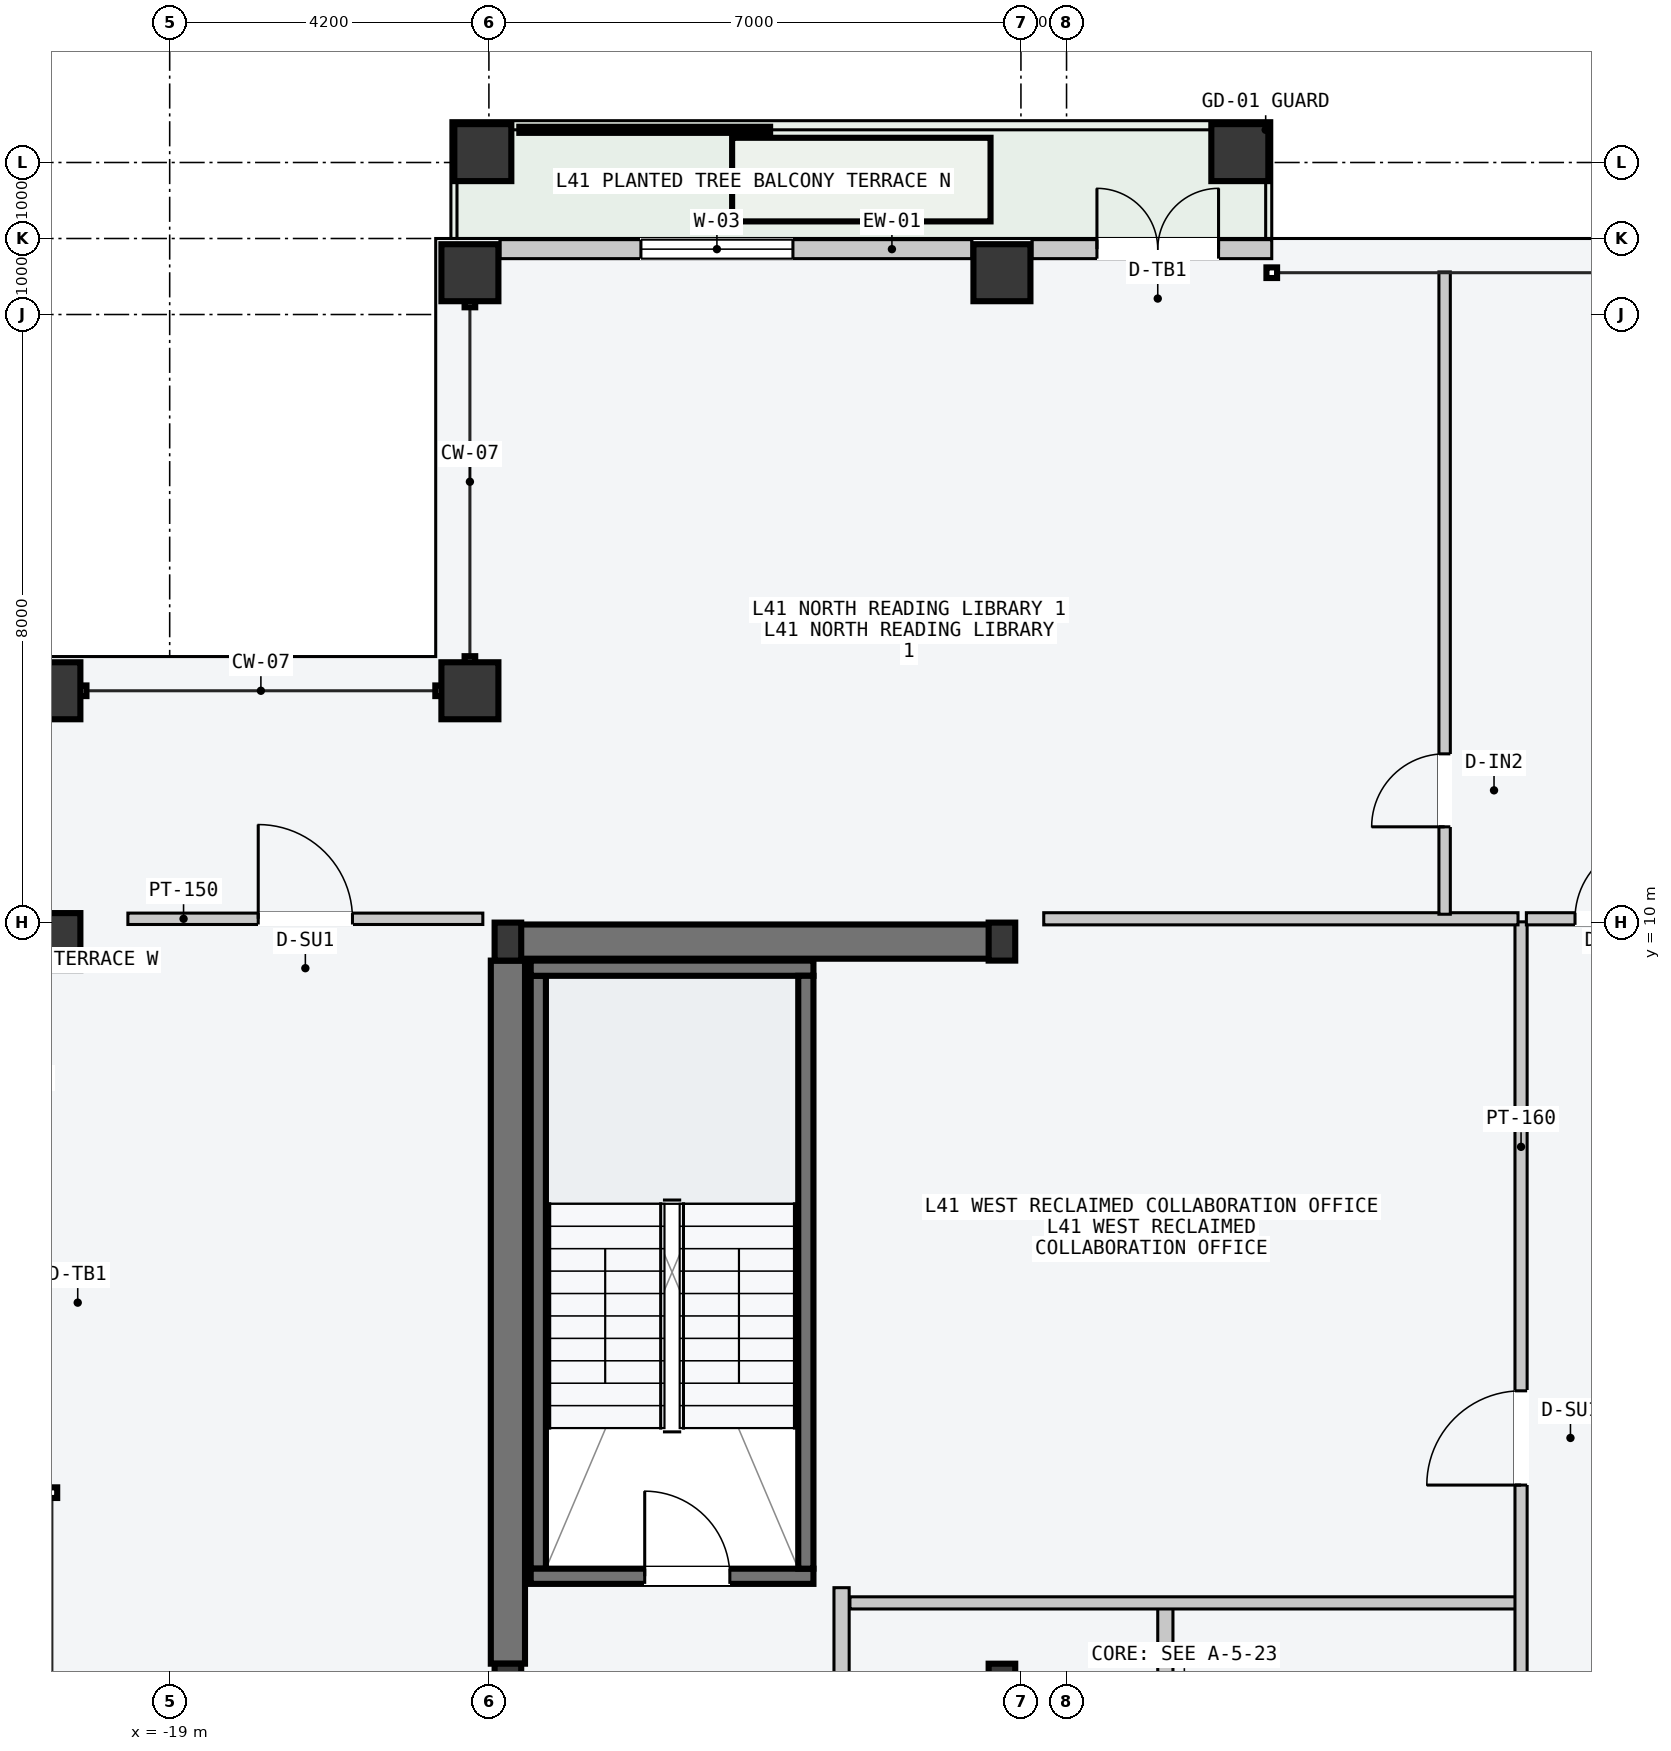
"""IFC4 building model, lengths in metres.
Left out: names, types, materials, properties, quantities, classifications, styles, units other than length and angle.
Written with IfcOpenShell. Run it as: python <this file> out.ifc"""

import sys

from ifc_helpers import new_model, si_unit, direction, frame, frame_2d, origin, origin_2d, place, context, subcontext, project, spatial, rectangle, hollow_rectangle, i_section, extrude, element, fill, save


model = new_model("IFC4")
c1 = context("Model", 3, precision=1e-05, world=origin(), true_north=direction((0.0, 1.0)))
c2 = subcontext(c1, "Body", "Model", "MODEL_VIEW")
j1 = project(units=[si_unit("LENGTHUNIT", "METRE"), si_unit("PLANEANGLEUNIT", "RADIAN")], contexts=[c1])
p1 = place(None, origin())
s1 = spatial("IfcSite", under=j1, at=p1, CompositionType="ELEMENT")
p2 = place(p1, origin())
s2 = spatial("IfcBuilding", under=s1, at=p2, CompositionType="ELEMENT")
p3 = place(p2, frame((0.0, 0.0, 158.7)))
s3 = spatial("IfcBuildingStorey", under=s2, at=p3, CompositionType="ELEMENT", Elevation=158.7)
p4 = place(p3, frame((-14.53, 9.75, -0.2), z_axis=(0.0, 0.0, 1.0), x_axis=(1.0, 0.0, 0.0)))
e1 = element("IfcWall", 1, at=p4, inside=s3, PredefinedType="SHEAR", context=c2, shape_type="SweptSolid", body=[
    extrude(rectangle(XDim=6.46, YDim=0.45, at=frame_2d((3.23, 0.0))), origin(), (0.0, 0.0, 1.0), 3.6),
])
p5 = place(p3, frame((-14.55, 0.25, -0.2), z_axis=(0.0, 0.0, 1.0), x_axis=(0.0, 1.0, 0.0)))
e2 = element("IfcWall", 2, at=p5, inside=s3, PredefinedType="SHEAR", context=c2, shape_type="SweptSolid", body=[
    extrude(rectangle(XDim=9.25, YDim=0.45, at=frame_2d((4.625, 0.0))), origin(), (0.0, 0.0, 1.0), 3.6),
])
p6 = place(p3, frame((-14.15, 1.5, -0.2), z_axis=(0.0, 0.0, 1.0), x_axis=(0.0, 1.0, 0.0)))
e3 = element("IfcWall", 3, at=p6, inside=s3, PredefinedType="SOLIDWALL", context=c2, shape_type="SweptSolid", body=[
    extrude(rectangle(XDim=7.8, YDim=0.2, at=frame_2d((3.9, 0.0))), origin(), (0.0, 0.0, 1.0), 3.6),
])
p7 = place(p3, frame((-14.25, 1.4, -0.2), z_axis=(0.0, 0.0, 1.0), x_axis=(1.0, 0.0, 0.0)))
e4 = element("IfcWall", 4, at=p7, inside=s3, PredefinedType="SOLIDWALL", context=c2, shape_type="SweptSolid", body=[
    extrude(rectangle(XDim=3.72, YDim=0.2, at=frame_2d((1.86, 0.0))), origin(), (0.0, 0.0, 1.0), 3.6),
])
p8 = place(p7, frame((1.5, 0.0, 0.2)))
e5 = element("IfcOpeningElement", 5, at=p8, cuts=e4, PredefinedType="OPENING", context=c2, shape_type="SweptSolid", body=[
    extrude(rectangle(XDim=1.12, YDim=2.18, at=frame_2d((0.56, 1.09))), frame((0.0, 0.11, 0.0), z_axis=(0.0, -1.0, 0.0), x_axis=(1.0, 0.0, 0.0)), (0.0, 0.0, 1.0), 0.22),
])
p9 = place(p3, frame((-14.25, 9.4, -0.2), z_axis=(0.0, 0.0, 1.0), x_axis=(1.0, 0.0, 0.0)))
e6 = element("IfcWall", 6, at=p9, inside=s3, PredefinedType="SOLIDWALL", context=c2, shape_type="SweptSolid", body=[
    extrude(rectangle(XDim=3.72, YDim=0.2, at=frame_2d((1.86, 0.0))), origin(), (0.0, 0.0, 1.0), 3.6),
])
p10 = place(p3, frame((-10.63, 1.5, -0.2), z_axis=(0.0, 0.0, 1.0), x_axis=(0.0, 1.0, 0.0)))
e7 = element("IfcWall", 7, at=p10, inside=s3, PredefinedType="SOLIDWALL", context=c2, shape_type="SweptSolid", body=[
    extrude(rectangle(XDim=7.8, YDim=0.2, at=frame_2d((3.9, 0.0))), origin(), (0.0, 0.0, 1.0), 3.6),
])
for number, where, z_axis, x_axis in (
    (8, (-14.55, 0.0, 0.0), (0.0, 0.0, 1.0), (1.0, 0.0, 0.0)),
    (9, (-14.55, 9.75, 0.0), (0.0, 0.0, 1.0), (1.0, 0.0, 0.0)),
    (10, (-8.05, 0.0, 0.0), (0.0, 0.0, 1.0), (1.0, 0.0, 0.0)),
    (11, (-8.05, 9.75, 0.0), (0.0, 0.0, 1.0), (1.0, 0.0, 0.0)),
):
    element("IfcColumn", number, at=place(p3, frame(where, z_axis=z_axis, x_axis=x_axis)), inside=s3, PredefinedType="COLUMN", context=c2, shape_type="SweptSolid", body=[
        extrude(i_section(OverallWidth=0.35, OverallDepth=0.5, WebThickness=0.02, FlangeThickness=0.032, at=origin_2d()), origin(), (0.0, 0.0, 1.0), 3.6),
    ])
for number, where, z_axis, x_axis in (
    (12, (-15.05, 18.55, 0.0), (0.0, 0.0, 1.0), (1.0, 0.0, 0.0)),
    (13, (-8.05, 18.55, 0.0), (0.0, 0.0, 1.0), (1.0, 0.0, 0.0)),
    (14, (-20.55, 9.75, 0.0), (0.0, 0.0, 1.0), (0.0, 1.0, 0.0)),
    (15, (-20.55, 13.05, 0.0), (0.0, 0.0, 1.0), (0.0, 1.0, 0.0)),
    (16, (-15.05, 13.05, 0.0), (0.0, 0.0, 1.0), (1.0, 0.0, 0.0)),
):
    element("IfcColumn", number, at=place(p3, frame(where, z_axis=z_axis, x_axis=x_axis)), inside=s3, PredefinedType="COLUMN", context=c2, shape_type="SweptSolid", body=[
        extrude(hollow_rectangle(XDim=0.75, YDim=0.75, WallThickness=0.032, at=origin_2d()), origin(), (0.0, 0.0, 1.0), 3.6),
    ])
for number, where, z_axis, x_axis in (
    (17, (-14.88, 20.13, -0.2), (0.0, 0.0, 1.0), (1.0, 0.0, 0.0)),
    (18, (-4.92, 20.13, -0.2), (0.0, 0.0, 1.0), (1.0, 0.0, 0.0)),
):
    element("IfcColumn", number, at=place(p3, frame(where, z_axis=z_axis, x_axis=x_axis)), inside=s3, PredefinedType="COLUMN", context=c2, shape_type="SweptSolid", body=[
        extrude(hollow_rectangle(XDim=0.75, YDim=0.75, WallThickness=0.032, at=origin_2d()), origin(), (0.0, 0.0, 1.0), 3.8),
    ])
p11 = place(p3, frame((-14.655, 18.86, 0.0), z_axis=(0.0, 0.0, 1.0), x_axis=(1.0, 0.0, 0.0)))
e19 = element("IfcWall", 19, at=p11, inside=s3, PredefinedType="STANDARD", context=c2, shape_type="SweptSolid", body=[
    extrude(rectangle(XDim=6.21, YDim=0.25, at=frame_2d((3.105, 0.0))), origin(), (0.0, 0.0, 1.0), 3.4),
])
p12 = place(p11, frame((1.855, 0.0, 0.85)))
e20 = element("IfcOpeningElement", 20, at=p12, cuts=e19, PredefinedType="OPENING", context=c2, shape_type="SweptSolid", body=[
    extrude(rectangle(XDim=2.0, YDim=2.1, at=frame_2d((1.0, 1.05))), frame((0.0, 0.135, 0.0), z_axis=(0.0, -1.0, 0.0), x_axis=(1.0, 0.0, 0.0)), (0.0, 0.0, 1.0), 0.27),
])
p13 = place(p3, frame((-7.655, 18.86, 0.0), z_axis=(0.0, 0.0, 1.0), x_axis=(1.0, 0.0, 0.0)))
e21 = element("IfcWall", 21, at=p13, inside=s3, PredefinedType="STANDARD", context=c2, shape_type="SweptSolid", body=[
    extrude(rectangle(XDim=3.155, YDim=0.25, at=frame_2d((1.578, 0.0))), origin(), (0.0, 0.0, 1.0), 3.4),
])
p14 = place(p13, frame((0.855, 0.0, 0.0)))
e22 = element("IfcOpeningElement", 22, at=p14, cuts=e21, PredefinedType="OPENING", context=c2, shape_type="SweptSolid", body=[
    extrude(rectangle(XDim=1.6, YDim=2.2, at=frame_2d((0.8, 1.1))), frame((0.0, 0.135, 0.0), z_axis=(0.0, -1.0, 0.0), x_axis=(1.0, 0.0, 0.0)), (0.0, 0.0, 1.0), 0.27),
])
p15 = place(p3, frame((-5.9, -9.45, 0.0), z_axis=(0.0, 0.0, 1.0), x_axis=(0.0, 1.0, 0.0)))
e23 = element("IfcWall", 23, at=p15, inside=s3, PredefinedType="PARTITIONING", context=c2, shape_type="SweptSolid", body=[
    extrude(rectangle(XDim=10.5, YDim=0.2, at=frame_2d((5.25, 0.0))), origin(), (0.0, 0.0, 1.0), 3.4),
])
p16 = place(p15, frame((3.9, 0.0, 0.0)))
e24 = element("IfcOpeningElement", 24, at=p16, cuts=e23, PredefinedType="OPENING", context=c2, shape_type="SweptSolid", body=[
    extrude(rectangle(XDim=1.5, YDim=2.2, at=frame_2d((0.75, 1.1))), frame((0.0, 0.11, 0.0), z_axis=(0.0, -1.0, 0.0), x_axis=(1.0, 0.0, 0.0)), (0.0, 0.0, 1.0), 0.22),
])
p17 = place(p3, frame((-10.16, -2.55, 0.0), z_axis=(0.0, 0.0, 1.0), x_axis=(0.0, 1.0, 0.0)))
e25 = element("IfcWall", 25, at=p17, inside=s3, PredefinedType="PARTITIONING", context=c2, shape_type="SweptSolid", body=[
    extrude(rectangle(XDim=3.8, YDim=0.2, at=frame_2d((1.9, 0.0))), origin(), (0.0, 0.0, 1.0), 3.4),
])
p18 = place(p17, frame((1.3, 0.0, 0.0)))
e26 = element("IfcOpeningElement", 26, at=p18, cuts=e25, PredefinedType="OPENING", context=c2, shape_type="SweptSolid", body=[
    extrude(rectangle(XDim=1.1, YDim=2.15, at=frame_2d((0.55, 1.075))), frame((0.0, 0.11, 0.0), z_axis=(0.0, -1.0, 0.0), x_axis=(1.0, 0.0, 0.0)), (0.0, 0.0, 1.0), 0.22),
])
p19 = place(p3, frame((-10.05, 1.05, 0.0), z_axis=(0.0, 0.0, 1.0), x_axis=(1.0, 0.0, 0.0)))
e27 = element("IfcWall", 27, at=p19, inside=s3, PredefinedType="PARTITIONING", context=c2, shape_type="SweptSolid", body=[
    extrude(rectangle(XDim=8.79, YDim=0.16, at=frame_2d((4.395, 0.0))), origin(), (0.0, 0.0, 1.0), 3.4),
])
p20 = place(p3, frame((-1.22, -3.5, 0.0), z_axis=(0.0, 0.0, 1.0), x_axis=(0.0, 1.0, 0.0)))
e28 = element("IfcWall", 28, at=p20, inside=s3, PredefinedType="PARTITIONING", context=c2, shape_type="SweptSolid", body=[
    extrude(rectangle(XDim=13.51, YDim=0.16, at=frame_2d((6.755, 0.0))), origin(), (0.0, 0.0, 1.0), 3.4),
])
p21 = place(p20, frame((6.1, 0.0, 0.0)))
e29 = element("IfcOpeningElement", 29, at=p21, cuts=e28, PredefinedType="OPENING", context=c2, shape_type="SweptSolid", body=[
    extrude(rectangle(XDim=1.24, YDim=2.24, at=frame_2d((0.62, 1.12))), frame((0.0, 0.09, 0.0), z_axis=(0.0, -1.0, 0.0), x_axis=(1.0, 0.0, 0.0)), (0.0, 0.0, 1.0), 0.18),
])
p22 = place(p20, frame((1.6, 0.0, 0.0)))
e30 = element("IfcOpeningElement", 30, at=p22, cuts=e28, PredefinedType="OPENING", context=c2, shape_type="SweptSolid", body=[
    extrude(rectangle(XDim=0.96, YDim=2.18, at=frame_2d((0.48, 1.09))), frame((0.0, 0.09, 0.0), z_axis=(0.0, -1.0, 0.0), x_axis=(1.0, 0.0, 0.0)), (0.0, 0.0, 1.0), 0.18),
])
p23 = place(p3, frame((-7.5, 10.05, 0.0), z_axis=(0.0, 0.0, 1.0), x_axis=(1.0, 0.0, 0.0)))
e31 = element("IfcWall", 31, at=p23, inside=s3, PredefinedType="PARTITIONING", context=c2, shape_type="SweptSolid", body=[
    extrude(rectangle(XDim=6.24, YDim=0.16, at=frame_2d((3.12, 0.0))), origin(), (0.0, 0.0, 1.0), 3.4),
])
p24 = place(p3, frame((-2.226, 10.11, 0.0), z_axis=(0.0, 0.0, 1.0), x_axis=(0.0, 1.0, 0.0)))
e32 = element("IfcWall", 32, at=p24, inside=s3, PredefinedType="PARTITIONING", context=c2, shape_type="SweptSolid", body=[
    extrude(rectangle(XDim=8.45, YDim=0.15, at=frame_2d((4.225, 0.0))), origin(), (0.0, 0.0, 1.0), 3.4),
])
p25 = place(p24, frame((1.15, 0.0, 0.0)))
e33 = element("IfcOpeningElement", 33, at=p25, cuts=e32, PredefinedType="OPENING", context=c2, shape_type="SweptSolid", body=[
    extrude(rectangle(XDim=0.96, YDim=2.18, at=frame_2d((0.48, 1.09))), frame((0.0, 0.085, 0.0), z_axis=(0.0, -1.0, 0.0), x_axis=(1.0, 0.0, 0.0)), (0.0, 0.0, 1.0), 0.17),
])
p26 = place(p3, frame((-1.15, 10.05, 0.0), z_axis=(0.0, 0.0, 1.0), x_axis=(1.0, 0.0, 0.0)))
e34 = element("IfcWall", 34, at=p26, inside=s3, PredefinedType="PARTITIONING", context=c2, shape_type="SweptSolid", body=[
    extrude(rectangle(XDim=2.3, YDim=0.16, at=frame_2d((1.15, 0.0))), origin(), (0.0, 0.0, 1.0), 3.4),
])
p27 = place(p26, frame((0.64, 0.0, 0.0)))
e35 = element("IfcOpeningElement", 35, at=p27, cuts=e34, PredefinedType="OPENING", context=c2, shape_type="SweptSolid", body=[
    extrude(rectangle(XDim=1.02, YDim=2.2, at=frame_2d((0.51, 1.1))), frame((0.0, 0.09, 0.0), z_axis=(0.0, -1.0, 0.0), x_axis=(1.0, 0.0, 0.0)), (0.0, 0.0, 1.0), 0.18),
])
p28 = place(p3, frame((-19.55, 10.05, 0.0), z_axis=(0.0, 0.0, 1.0), x_axis=(1.0, 0.0, 0.0)))
e36 = element("IfcWall", 36, at=p28, inside=s3, PredefinedType="PARTITIONING", context=c2, shape_type="SweptSolid", body=[
    extrude(rectangle(XDim=4.67, YDim=0.15, at=frame_2d((2.335, 0.0))), origin(), (0.0, 0.0, 1.0), 3.4),
])
p29 = place(p28, frame((1.715, 0.0, 0.0)))
e37 = element("IfcOpeningElement", 37, at=p29, cuts=e36, PredefinedType="OPENING", context=c2, shape_type="SweptSolid", body=[
    extrude(rectangle(XDim=1.24, YDim=2.24, at=frame_2d((0.62, 1.12))), frame((0.0, 0.085, 0.0), z_axis=(0.0, -1.0, 0.0), x_axis=(1.0, 0.0, 0.0)), (0.0, 0.0, 1.0), 0.17),
])
p30 = place(p8, origin())
e38 = element("IfcDoor", 38, at=p30, inside=s3, OperationType="SINGLE_SWING_LEFT", PredefinedType="DOOR", context=c2, shape_type="SweptSolid", body=[
    extrude(rectangle(XDim=1.12, YDim=2.18, at=frame_2d((0.56, 1.09))), frame((0.0, 0.025, 0.0), z_axis=(0.0, -1.0, 0.0), x_axis=(1.0, 0.0, 0.0)), (0.0, 0.0, 1.0), 0.05),
])
fill(e5, e38)
p31 = place(p12, origin())
e39 = element("IfcWindow", 39, at=p31, inside=s3, PartitioningType="SINGLE_PANEL", PredefinedType="WINDOW", context=c2, shape_type="SweptSolid", body=[
    extrude(rectangle(XDim=2.0, YDim=2.1, at=frame_2d((1.0, 1.05))), frame((0.0, 0.03, 0.0), z_axis=(0.0, -1.0, 0.0), x_axis=(1.0, 0.0, 0.0)), (0.0, 0.0, 1.0), 0.06),
])
fill(e20, e39)
p32 = place(p14, origin())
e40 = element("IfcDoor", 40, at=p32, inside=s3, OperationType="DOUBLE_DOOR_SINGLE_SWING", PredefinedType="DOOR", context=c2, shape_type="SweptSolid", body=[
    extrude(rectangle(XDim=1.6, YDim=2.2, at=frame_2d((0.8, 1.1))), frame((0.0, 0.025, 0.0), z_axis=(0.0, -1.0, 0.0), x_axis=(1.0, 0.0, 0.0)), (0.0, 0.0, 1.0), 0.05),
])
fill(e22, e40)
p33 = place(p21, origin())
e41 = element("IfcDoor", 41, at=p33, inside=s3, OperationType="SINGLE_SWING_LEFT", PredefinedType="DOOR", context=c2, shape_type="SweptSolid", body=[
    extrude(rectangle(XDim=1.24, YDim=2.24, at=frame_2d((0.62, 1.12))), frame((0.0, 0.025, 0.0), z_axis=(0.0, -1.0, 0.0), x_axis=(1.0, 0.0, 0.0)), (0.0, 0.0, 1.0), 0.05),
])
fill(e29, e41)
p34 = place(p25, origin())
e42 = element("IfcDoor", 42, at=p34, inside=s3, OperationType="SINGLE_SWING_LEFT", PredefinedType="DOOR", context=c2, shape_type="SweptSolid", body=[
    extrude(rectangle(XDim=0.96, YDim=2.18, at=frame_2d((0.48, 1.09))), frame((0.0, 0.025, 0.0), z_axis=(0.0, -1.0, 0.0), x_axis=(1.0, 0.0, 0.0)), (0.0, 0.0, 1.0), 0.05),
])
fill(e33, e42)
p35 = place(p27, origin())
e43 = element("IfcDoor", 43, at=p35, inside=s3, OperationType="SINGLE_SWING_RIGHT", PredefinedType="DOOR", context=c2, shape_type="SweptSolid", body=[
    extrude(rectangle(XDim=1.02, YDim=2.2, at=frame_2d((0.51, 1.1))), frame((0.0, 0.025, 0.0), z_axis=(0.0, -1.0, 0.0), x_axis=(1.0, 0.0, 0.0)), (0.0, 0.0, 1.0), 0.05),
])
fill(e35, e43)
p36 = place(p29, origin())
e44 = element("IfcDoor", 44, at=p36, inside=s3, OperationType="SINGLE_SWING_LEFT", PredefinedType="DOOR", context=c2, shape_type="SweptSolid", body=[
    extrude(rectangle(XDim=1.24, YDim=2.24, at=frame_2d((0.62, 1.12))), frame((0.0, 0.025, 0.0), z_axis=(0.0, -1.0, 0.0), x_axis=(1.0, 0.0, 0.0)), (0.0, 0.0, 1.0), 0.05),
])
fill(e37, e44)
save(model, sys.argv[1])
